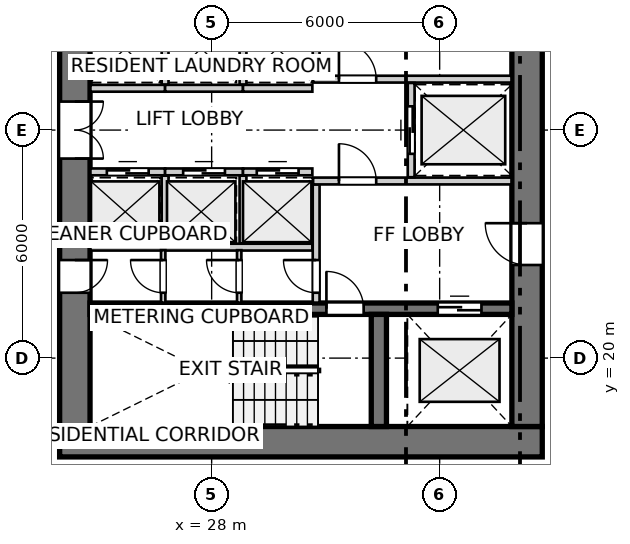
"""IFC4 building model, lengths in metres.
Left out: names, types, materials, properties, quantities, classifications, styles, units other than length and angle.
Written with IfcOpenShell. Run it as: python <this file> out.ifc"""

import sys

from ifc_helpers import new_model, si_unit, direction, frame, frame_2d, origin, place, context, subcontext, project, spatial, rectangle, extrude, source, transform, mapped, element, fill, save


model = new_model("IFC4")
c1 = context("Model", 3, precision=1e-05, world=origin(), true_north=direction((0.0, 1.0)))
c2 = subcontext(c1, "Body", "Model", "MODEL_VIEW")
j1 = project(units=[si_unit("LENGTHUNIT", "METRE"), si_unit("PLANEANGLEUNIT", "RADIAN")], contexts=[c1])
p1 = place(None, origin())
s1 = spatial("IfcSite", under=j1, at=p1, CompositionType="ELEMENT")
p2 = place(p1, origin())
s2 = spatial("IfcBuilding", under=s1, at=p2, CompositionType="ELEMENT")
p3 = place(p2, frame((0.0, 0.0, 30.2)))
s3 = spatial("IfcBuildingStorey", under=s2, at=p3, CompositionType="ELEMENT", Elevation=30.2)
p4 = place(p3, frame((24.0, 17.8, 0.0), z_axis=(0.0, 0.0, 1.0), x_axis=(1.0, 0.0, 0.0)))
e1 = element("IfcWall", 1, at=p4, inside=s3, PredefinedType="SHEAR", context=c2, shape_type="SweptSolid", body=[
    extrude(rectangle(XDim=12.7, YDim=0.8, at=frame_2d((6.35, 0.0))), origin(), (0.0, 0.0, 1.0), 2.935),
])
p5 = place(p3, frame((24.4, 33.8, 0.0), z_axis=(0.0, 0.0, 1.0), x_axis=(0.0, -1.0, 0.0)))
e2 = element("IfcWall", 2, at=p5, inside=s3, PredefinedType="SHEAR", context=c2, shape_type="SweptSolid", body=[
    extrude(rectangle(XDim=15.6, YDim=0.8, at=frame_2d((7.8, 0.0))), origin(), (0.0, 0.0, 1.0), 2.935),
])
p6 = place(p5, frame((7.05, 0.0, 0.0)))
e3 = element("IfcOpeningElement", 3, at=p6, cuts=e2, PredefinedType="OPENING", context=c2, shape_type="SweptSolid", body=[
    extrude(rectangle(XDim=1.5, YDim=2.15, at=frame_2d((0.75, 1.075))), frame((0.0, 0.41, 0.0), z_axis=(0.0, -1.0, 0.0), x_axis=(1.0, 0.0, 0.0)), (0.0, 0.0, 1.0), 0.82),
])
p7 = place(p5, frame((3.52, 0.0, 0.0)))
e4 = element("IfcOpeningElement", 4, at=p7, cuts=e2, PredefinedType="OPENING", context=c2, shape_type="SweptSolid", body=[
    extrude(rectangle(XDim=0.86, YDim=2.05, at=frame_2d((0.43, 1.025))), frame((0.0, 0.41, 0.0), z_axis=(0.0, -1.0, 0.0), x_axis=(1.0, 0.0, 0.0)), (0.0, 0.0, 1.0), 0.82),
])
p8 = place(p5, frame((11.22, 0.0, 0.0)))
e5 = element("IfcOpeningElement", 5, at=p8, cuts=e2, PredefinedType="OPENING", context=c2, shape_type="SweptSolid", body=[
    extrude(rectangle(XDim=0.86, YDim=2.05, at=frame_2d((0.43, 1.025))), frame((0.0, 0.41, 0.0), z_axis=(0.0, -1.0, 0.0), x_axis=(1.0, 0.0, 0.0)), (0.0, 0.0, 1.0), 0.82),
])
p9 = place(p3, frame((36.3, 18.2, 0.0), z_axis=(0.0, 0.0, 1.0), x_axis=(0.0, 1.0, 0.0)))
e6 = element("IfcWall", 6, at=p9, inside=s3, PredefinedType="SHEAR", context=c2, shape_type="SweptSolid", body=[
    extrude(rectangle(XDim=15.6, YDim=0.8, at=frame_2d((7.8, 0.0))), origin(), (0.0, 0.0, 1.0), 2.935),
])
p10 = place(p9, frame((4.25, 0.0, 0.0)))
e7 = element("IfcOpeningElement", 7, at=p10, cuts=e6, PredefinedType="OPENING", context=c2, shape_type="SweptSolid", body=[
    extrude(rectangle(XDim=1.1, YDim=2.15, at=frame_2d((0.55, 1.075))), frame((0.0, 0.41, 0.0), z_axis=(0.0, -1.0, 0.0), x_axis=(1.0, 0.0, 0.0)), (0.0, 0.0, 1.0), 0.82),
])
p11 = place(p9, frame((10.25, 0.0, 0.0)))
e8 = element("IfcOpeningElement", 8, at=p11, cuts=e6, PredefinedType="OPENING", context=c2, shape_type="SweptSolid", body=[
    extrude(rectangle(XDim=1.1, YDim=2.15, at=frame_2d((0.55, 1.075))), frame((0.0, 0.41, 0.0), z_axis=(0.0, -1.0, 0.0), x_axis=(1.0, 0.0, 0.0)), (0.0, 0.0, 1.0), 0.82),
])
p12 = place(p3, frame((24.8, 21.3, 0.0), z_axis=(0.0, 0.0, 1.0), x_axis=(1.0, 0.0, 0.0)))
e9 = element("IfcWall", 9, at=p12, inside=s3, PredefinedType="SHEAR", context=c2, shape_type="SweptSolid", body=[
    extrude(rectangle(XDim=11.1, YDim=0.3, at=frame_2d((5.55, 0.0))), origin(), (0.0, 0.0, 1.0), 2.935),
])
p13 = place(p12, frame((6.22, 0.0, 0.0)))
e10 = element("IfcOpeningElement", 10, at=p13, cuts=e9, PredefinedType="OPENING", context=c2, shape_type="SweptSolid", body=[
    extrude(rectangle(XDim=0.98, YDim=2.15, at=frame_2d((0.49, 1.075))), frame((0.0, 0.16, 0.0), z_axis=(0.0, -1.0, 0.0), x_axis=(1.0, 0.0, 0.0)), (0.0, 0.0, 1.0), 0.32),
])
p14 = place(p12, frame((9.15, 0.0, 0.0)))
e11 = element("IfcOpeningElement", 11, at=p14, cuts=e9, PredefinedType="OPENING", context=c2, shape_type="SweptSolid", body=[
    extrude(rectangle(XDim=1.15, YDim=2.15, at=frame_2d((0.575, 1.075))), frame((0.0, 0.16, 0.0), z_axis=(0.0, -1.0, 0.0), x_axis=(1.0, 0.0, 0.0)), (0.0, 0.0, 1.0), 0.32),
])
p15 = place(p3, frame((32.4, 18.2, 0.0), z_axis=(0.0, 0.0, 1.0), x_axis=(0.0, 1.0, 0.0)))
e12 = element("IfcWall", 12, at=p15, inside=s3, PredefinedType="SHEAR", context=c2, shape_type="SweptSolid", body=[
    extrude(rectangle(XDim=2.95, YDim=0.4, at=frame_2d((1.475, 0.0))), origin(), (0.0, 0.0, 1.0), 2.935),
])
p16 = place(p3, frame((30.75, 21.46, 0.0), z_axis=(0.0, 0.0, 1.0), x_axis=(0.0, 1.0, 0.0)))
e13 = element("IfcWall", 13, at=p16, inside=s3, PredefinedType="PARTITIONING", context=c2, shape_type="SweptSolid", body=[
    extrude(rectangle(XDim=3.11, YDim=0.18, at=frame_2d((1.555, 0.0))), origin(), (0.0, 0.0, 1.0), 2.935),
])
p17 = place(p16, frame((0.26, 0.0, 0.0)))
e14 = element("IfcOpeningElement", 14, at=p17, cuts=e13, PredefinedType="OPENING", context=c2, shape_type="SweptSolid", body=[
    extrude(rectangle(XDim=0.86, YDim=2.05, at=frame_2d((0.43, 1.025))), frame((0.0, 0.1, 0.0), z_axis=(0.0, -1.0, 0.0), x_axis=(1.0, 0.0, 0.0)), (0.0, 0.0, 1.0), 0.2),
])
p18 = place(p3, frame((30.67, 24.66, 0.0), z_axis=(0.0, 0.0, 1.0), x_axis=(1.0, 0.0, 0.0)))
e15 = element("IfcWall", 15, at=p18, inside=s3, PredefinedType="PARTITIONING", context=c2, shape_type="SweptSolid", body=[
    extrude(rectangle(XDim=5.22, YDim=0.18, at=frame_2d((2.61, 0.0))), origin(), (0.0, 0.0, 1.0), 2.935),
])
p19 = place(p18, frame((0.68, 0.0, 0.0)))
e16 = element("IfcOpeningElement", 16, at=p19, cuts=e15, PredefinedType="OPENING", context=c2, shape_type="SweptSolid", body=[
    extrude(rectangle(XDim=0.98, YDim=2.15, at=frame_2d((0.49, 1.075))), frame((0.0, 0.1, 0.0), z_axis=(0.0, -1.0, 0.0), x_axis=(1.0, 0.0, 0.0)), (0.0, 0.0, 1.0), 0.2),
])
p20 = place(p3, frame((30.75, 27.43, 0.0), z_axis=(0.0, 0.0, 1.0), x_axis=(0.0, 1.0, 0.0)))
e17 = element("IfcWall", 17, at=p20, inside=s3, PredefinedType="PARTITIONING", context=c2, shape_type="SweptSolid", body=[
    extrude(rectangle(XDim=3.11, YDim=0.18, at=frame_2d((1.555, 0.0))), origin(), (0.0, 0.0, 1.0), 2.935),
])
p21 = place(p20, frame((1.98, 0.0, 0.0)))
e18 = element("IfcOpeningElement", 18, at=p21, cuts=e17, PredefinedType="OPENING", context=c2, shape_type="SweptSolid", body=[
    extrude(rectangle(XDim=0.86, YDim=2.05, at=frame_2d((0.43, 1.025))), frame((0.0, 0.1, 0.0), z_axis=(0.0, -1.0, 0.0), x_axis=(1.0, 0.0, 0.0)), (0.0, 0.0, 1.0), 0.2),
])
p22 = place(p3, frame((30.67, 27.34, 0.0), z_axis=(0.0, 0.0, 1.0), x_axis=(1.0, 0.0, 0.0)))
e19 = element("IfcWall", 19, at=p22, inside=s3, PredefinedType="PARTITIONING", context=c2, shape_type="SweptSolid", body=[
    extrude(rectangle(XDim=5.22, YDim=0.18, at=frame_2d((2.61, 0.0))), origin(), (0.0, 0.0, 1.0), 2.935),
])
p23 = place(p22, frame((0.68, 0.0, 0.0)))
e20 = element("IfcOpeningElement", 20, at=p23, cuts=e19, PredefinedType="OPENING", context=c2, shape_type="SweptSolid", body=[
    extrude(rectangle(XDim=0.98, YDim=2.15, at=frame_2d((0.49, 1.075))), frame((0.0, 0.1, 0.0), z_axis=(0.0, -1.0, 0.0), x_axis=(1.0, 0.0, 0.0)), (0.0, 0.0, 1.0), 0.2),
])
p24 = place(p3, frame((33.25, 24.76, 0.0), z_axis=(0.0, 0.0, 1.0), x_axis=(0.0, 1.0, 0.0)))
e21 = element("IfcWall", 21, at=p24, inside=s3, PredefinedType="PARTITIONING", context=c2, shape_type="SweptSolid", body=[
    extrude(rectangle(XDim=2.48, YDim=0.18, at=frame_2d((1.24, 0.0))), origin(), (0.0, 0.0, 1.0), 2.935),
])
p25 = place(p24, frame((0.615, 0.0, 0.0)))
e22 = element("IfcOpeningElement", 22, at=p25, cuts=e21, PredefinedType="OPENING", context=c2, shape_type="SweptSolid", body=[
    extrude(rectangle(XDim=1.25, YDim=2.15, at=frame_2d((0.625, 1.075))), frame((0.0, 0.1, 0.0), z_axis=(0.0, -1.0, 0.0), x_axis=(1.0, 0.0, 0.0)), (0.0, 0.0, 1.0), 0.2),
])
p26 = place(p3, frame((24.81, 22.92, 0.0), z_axis=(0.0, 0.0, 1.0), x_axis=(1.0, 0.0, 0.0)))
e23 = element("IfcWall", 23, at=p26, inside=s3, PredefinedType="PARTITIONING", context=c2, shape_type="SweptSolid", body=[
    extrude(rectangle(XDim=5.84, YDim=0.18, at=frame_2d((2.92, 0.0))), origin(), (0.0, 0.0, 1.0), 2.935),
])
p27 = place(p3, frame((24.81, 24.9, 0.0), z_axis=(0.0, 0.0, 1.0), x_axis=(1.0, 0.0, 0.0)))
e24 = element("IfcWall", 24, at=p27, inside=s3, PredefinedType="PARTITIONING", context=c2, shape_type="SweptSolid", body=[
    extrude(rectangle(XDim=1.965, YDim=0.18, at=frame_2d((0.982, 0.0))), origin(), (0.0, 0.0, 1.0), 2.935),
])
p28 = place(p27, frame((0.433, 0.0, 0.0)))
e25 = element("IfcOpeningElement", 25, at=p28, cuts=e24, PredefinedType="OPENING", context=c2, shape_type="SweptSolid", body=[
    extrude(rectangle(XDim=1.1, YDim=2.15, at=frame_2d((0.55, 1.075))), frame((0.0, 0.1, 0.0), z_axis=(0.0, -1.0, 0.0), x_axis=(1.0, 0.0, 0.0)), (0.0, 0.0, 1.0), 0.2),
])
p29 = place(p3, frame((26.775, 24.9, 0.0), z_axis=(0.0, 0.0, 1.0), x_axis=(1.0, 0.0, 0.0)))
e26 = element("IfcWall", 26, at=p29, inside=s3, PredefinedType="PARTITIONING", context=c2, shape_type="SweptSolid", body=[
    extrude(rectangle(XDim=2.05, YDim=0.18, at=frame_2d((1.025, 0.0))), origin(), (0.0, 0.0, 1.0), 2.935),
])
p30 = place(p29, frame((0.475, 0.0, 0.0)))
e27 = element("IfcOpeningElement", 27, at=p30, cuts=e26, PredefinedType="OPENING", context=c2, shape_type="SweptSolid", body=[
    extrude(rectangle(XDim=1.1, YDim=2.15, at=frame_2d((0.55, 1.075))), frame((0.0, 0.1, 0.0), z_axis=(0.0, -1.0, 0.0), x_axis=(1.0, 0.0, 0.0)), (0.0, 0.0, 1.0), 0.2),
])
p31 = place(p3, frame((26.775, 23.02, 0.0), z_axis=(0.0, 0.0, 1.0), x_axis=(0.0, 1.0, 0.0)))
e28 = element("IfcWall", 28, at=p31, inside=s3, PredefinedType="PARTITIONING", context=c2, shape_type="SweptSolid", body=[
    extrude(rectangle(XDim=1.78, YDim=0.18, at=frame_2d((0.89, 0.0))), origin(), (0.0, 0.0, 1.0), 2.935),
])
p32 = place(p3, frame((28.825, 24.9, 0.0), z_axis=(0.0, 0.0, 1.0), x_axis=(1.0, 0.0, 0.0)))
e29 = element("IfcWall", 29, at=p32, inside=s3, PredefinedType="PARTITIONING", context=c2, shape_type="SweptSolid", body=[
    extrude(rectangle(XDim=1.825, YDim=0.18, at=frame_2d((0.913, 0.0))), origin(), (0.0, 0.0, 1.0), 2.935),
])
p33 = place(p32, frame((0.363, 0.0, 0.0)))
e30 = element("IfcOpeningElement", 30, at=p33, cuts=e29, PredefinedType="OPENING", context=c2, shape_type="SweptSolid", body=[
    extrude(rectangle(XDim=1.1, YDim=2.15, at=frame_2d((0.55, 1.075))), frame((0.0, 0.1, 0.0), z_axis=(0.0, -1.0, 0.0), x_axis=(1.0, 0.0, 0.0)), (0.0, 0.0, 1.0), 0.2),
])
p34 = place(p3, frame((28.825, 23.02, 0.0), z_axis=(0.0, 0.0, 1.0), x_axis=(0.0, 1.0, 0.0)))
e31 = element("IfcWall", 31, at=p34, inside=s3, PredefinedType="PARTITIONING", context=c2, shape_type="SweptSolid", body=[
    extrude(rectangle(XDim=1.78, YDim=0.18, at=frame_2d((0.89, 0.0))), origin(), (0.0, 0.0, 1.0), 2.935),
])
p35 = place(p3, frame((24.81, 27.1, 0.0), z_axis=(0.0, 0.0, 1.0), x_axis=(1.0, 0.0, 0.0)))
e32 = element("IfcWall", 32, at=p35, inside=s3, PredefinedType="PARTITIONING", context=c2, shape_type="SweptSolid", body=[
    extrude(rectangle(XDim=1.965, YDim=0.18, at=frame_2d((0.982, 0.0))), origin(), (0.0, 0.0, 1.0), 2.935),
])
p36 = place(p3, frame((26.775, 27.1, 0.0), z_axis=(0.0, 0.0, 1.0), x_axis=(1.0, 0.0, 0.0)))
e33 = element("IfcWall", 33, at=p36, inside=s3, PredefinedType="PARTITIONING", context=c2, shape_type="SweptSolid", body=[
    extrude(rectangle(XDim=2.05, YDim=0.18, at=frame_2d((1.025, 0.0))), origin(), (0.0, 0.0, 1.0), 2.935),
])
p37 = place(p3, frame((26.775, 27.2, 0.0), z_axis=(0.0, 0.0, 1.0), x_axis=(0.0, 1.0, 0.0)))
e34 = element("IfcWall", 34, at=p37, inside=s3, PredefinedType="PARTITIONING", context=c2, shape_type="SweptSolid", body=[
    extrude(rectangle(XDim=1.78, YDim=0.18, at=frame_2d((0.89, 0.0))), origin(), (0.0, 0.0, 1.0), 2.935),
])
p38 = place(p3, frame((28.825, 27.1, 0.0), z_axis=(0.0, 0.0, 1.0), x_axis=(1.0, 0.0, 0.0)))
e35 = element("IfcWall", 35, at=p38, inside=s3, PredefinedType="PARTITIONING", context=c2, shape_type="SweptSolid", body=[
    extrude(rectangle(XDim=1.825, YDim=0.18, at=frame_2d((0.913, 0.0))), origin(), (0.0, 0.0, 1.0), 2.935),
])
p39 = place(p3, frame((28.825, 27.2, 0.0), z_axis=(0.0, 0.0, 1.0), x_axis=(0.0, 1.0, 0.0)))
e36 = element("IfcWall", 36, at=p39, inside=s3, PredefinedType="PARTITIONING", context=c2, shape_type="SweptSolid", body=[
    extrude(rectangle(XDim=1.78, YDim=0.18, at=frame_2d((0.89, 0.0))), origin(), (0.0, 0.0, 1.0), 2.935),
])
p40 = place(p3, frame((26.725, 21.46, 0.0), z_axis=(0.0, 0.0, 1.0), x_axis=(0.0, 1.0, 0.0)))
e37 = element("IfcWall", 37, at=p40, inside=s3, PredefinedType="PARTITIONING", context=c2, shape_type="SweptSolid", body=[
    extrude(rectangle(XDim=1.38, YDim=0.115, at=frame_2d((0.69, 0.0))), origin(), (0.0, 0.0, 1.0), 2.935),
])
p41 = place(p40, frame((0.26, 0.0, 0.0)))
e38 = element("IfcOpeningElement", 38, at=p41, cuts=e37, PredefinedType="OPENING", context=c2, shape_type="SweptSolid", body=[
    extrude(rectangle(XDim=0.86, YDim=2.05, at=frame_2d((0.43, 1.025))), frame((0.0, 0.067, 0.0), z_axis=(0.0, -1.0, 0.0), x_axis=(1.0, 0.0, 0.0)), (0.0, 0.0, 1.0), 0.135),
])
p42 = place(p3, frame((28.725, 21.46, 0.0), z_axis=(0.0, 0.0, 1.0), x_axis=(0.0, 1.0, 0.0)))
e39 = element("IfcWall", 39, at=p42, inside=s3, PredefinedType="PARTITIONING", context=c2, shape_type="SweptSolid", body=[
    extrude(rectangle(XDim=1.38, YDim=0.115, at=frame_2d((0.69, 0.0))), origin(), (0.0, 0.0, 1.0), 2.935),
])
p43 = place(p42, frame((0.26, 0.0, 0.0)))
e40 = element("IfcOpeningElement", 40, at=p43, cuts=e39, PredefinedType="OPENING", context=c2, shape_type="SweptSolid", body=[
    extrude(rectangle(XDim=0.86, YDim=2.05, at=frame_2d((0.43, 1.025))), frame((0.0, 0.067, 0.0), z_axis=(0.0, -1.0, 0.0), x_axis=(1.0, 0.0, 0.0)), (0.0, 0.0, 1.0), 0.135),
])
m1 = source(origin(), c2, "Body", "SweptSolid", [
    extrude(rectangle(XDim=0.98, YDim=2.15, at=frame_2d((0.49, 1.075))), frame((0.0, 0.025, 0.0), z_axis=(0.0, -1.0, 0.0), x_axis=(1.0, 0.0, 0.0)), (0.0, 0.0, 1.0), 0.05),
])
p44 = place(p13, origin())
e41 = element("IfcDoor", 41, at=p44, inside=s3, OperationType="SINGLE_SWING_LEFT", PredefinedType="DOOR", context=c2, shape_type="MappedRepresentation", body=[
    mapped(m1, transform((0.0, 0.0, 0.0), x_axis=(1.0, 0.0, 0.0), y_axis=(0.0, 1.0, 0.0), z_axis=(0.0, 0.0, 1.0), scale=1.0)),
])
fill(e10, e41)
m2 = source(origin(), c2, "Body", "SweptSolid", [
    extrude(rectangle(XDim=1.15, YDim=2.15, at=frame_2d((0.575, 1.075))), frame((0.0, 0.025, 0.0), z_axis=(0.0, -1.0, 0.0), x_axis=(1.0, 0.0, 0.0)), (0.0, 0.0, 1.0), 0.05),
])
p45 = place(p14, origin())
e42 = element("IfcDoor", 42, at=p45, inside=s3, OperationType="DOUBLE_DOOR_SLIDING", PredefinedType="DOOR", context=c2, shape_type="MappedRepresentation", body=[
    mapped(m2, transform((0.0, 0.0, 0.0), x_axis=(1.0, 0.0, 0.0), y_axis=(0.0, 1.0, 0.0), z_axis=(0.0, 0.0, 1.0), scale=1.0)),
])
fill(e11, e42)
m3 = source(origin(), c2, "Body", "SweptSolid", [
    extrude(rectangle(XDim=1.1, YDim=2.15, at=frame_2d((0.55, 1.075))), frame((0.0, 0.025, 0.0), z_axis=(0.0, -1.0, 0.0), x_axis=(1.0, 0.0, 0.0)), (0.0, 0.0, 1.0), 0.05),
])
p46 = place(p10, origin())
e43 = element("IfcDoor", 43, at=p46, inside=s3, OperationType="SINGLE_SWING_RIGHT", PredefinedType="DOOR", context=c2, shape_type="MappedRepresentation", body=[
    mapped(m3, transform((0.0, 0.0, 0.0), x_axis=(1.0, 0.0, 0.0), y_axis=(0.0, 1.0, 0.0), z_axis=(0.0, 0.0, 1.0), scale=1.0)),
])
fill(e7, e43)
m4 = source(origin(), c2, "Body", "SweptSolid", [
    extrude(rectangle(XDim=1.5, YDim=2.15, at=frame_2d((0.75, 1.075))), frame((0.0, 0.025, 0.0), z_axis=(0.0, -1.0, 0.0), x_axis=(1.0, 0.0, 0.0)), (0.0, 0.0, 1.0), 0.05),
])
p47 = place(p6, origin())
e44 = element("IfcDoor", 44, at=p47, inside=s3, OperationType="DOUBLE_DOOR_SINGLE_SWING", PredefinedType="DOOR", context=c2, shape_type="MappedRepresentation", body=[
    mapped(m4, transform((0.0, 0.0, 0.0), x_axis=(1.0, 0.0, 0.0), y_axis=(0.0, 1.0, 0.0), z_axis=(0.0, 0.0, 1.0), scale=1.0)),
])
fill(e3, e44)
m5 = source(origin(), c2, "Body", "SweptSolid", [
    extrude(rectangle(XDim=0.86, YDim=2.05, at=frame_2d((0.43, 1.025))), frame((0.0, 0.025, 0.0), z_axis=(0.0, -1.0, 0.0), x_axis=(1.0, 0.0, 0.0)), (0.0, 0.0, 1.0), 0.05),
])
p48 = place(p8, origin())
e45 = element("IfcDoor", 45, at=p48, inside=s3, OperationType="SINGLE_SWING_LEFT", PredefinedType="DOOR", context=c2, shape_type="MappedRepresentation", body=[
    mapped(m5, transform((0.0, 0.0, 0.0), x_axis=(1.0, 0.0, 0.0), y_axis=(0.0, 1.0, 0.0), z_axis=(0.0, 0.0, 1.0), scale=1.0)),
])
fill(e5, e45)
p49 = place(p17, origin())
e46 = element("IfcDoor", 46, at=p49, inside=s3, OperationType="SINGLE_SWING_RIGHT", PredefinedType="DOOR", context=c2, shape_type="MappedRepresentation", body=[
    mapped(m5, transform((0.0, 0.0, 0.0), x_axis=(1.0, 0.0, 0.0), y_axis=(0.0, 1.0, 0.0), z_axis=(0.0, 0.0, 1.0), scale=1.0)),
])
fill(e14, e46)
p50 = place(p19, origin())
e47 = element("IfcDoor", 47, at=p50, inside=s3, OperationType="SINGLE_SWING_LEFT", PredefinedType="DOOR", context=c2, shape_type="MappedRepresentation", body=[
    mapped(m1, transform((0.0, 0.0, 0.0), x_axis=(1.0, 0.0, 0.0), y_axis=(0.0, 1.0, 0.0), z_axis=(0.0, 0.0, 1.0), scale=1.0)),
])
fill(e16, e47)
p51 = place(p23, origin())
e48 = element("IfcDoor", 48, at=p51, inside=s3, OperationType="SINGLE_SWING_LEFT", PredefinedType="DOOR", context=c2, shape_type="MappedRepresentation", body=[
    mapped(m1, transform((0.0, 0.0, 0.0), x_axis=(1.0, 0.0, 0.0), y_axis=(0.0, 1.0, 0.0), z_axis=(0.0, 0.0, 1.0), scale=1.0)),
])
fill(e20, e48)
m6 = source(origin(), c2, "Body", "SweptSolid", [
    extrude(rectangle(XDim=1.25, YDim=2.15, at=frame_2d((0.625, 1.075))), frame((0.0, 0.025, 0.0), z_axis=(0.0, -1.0, 0.0), x_axis=(1.0, 0.0, 0.0)), (0.0, 0.0, 1.0), 0.05),
])
p52 = place(p25, origin())
e49 = element("IfcDoor", 49, at=p52, inside=s3, OperationType="DOUBLE_DOOR_SLIDING", PredefinedType="DOOR", context=c2, shape_type="MappedRepresentation", body=[
    mapped(m6, transform((0.0, 0.0, 0.0), x_axis=(1.0, 0.0, 0.0), y_axis=(0.0, 1.0, 0.0), z_axis=(0.0, 0.0, 1.0), scale=1.0)),
])
fill(e22, e49)
p53 = place(p28, origin())
e50 = element("IfcDoor", 50, at=p53, inside=s3, OperationType="DOUBLE_DOOR_SLIDING", PredefinedType="DOOR", context=c2, shape_type="MappedRepresentation", body=[
    mapped(m3, transform((0.0, 0.0, 0.0), x_axis=(1.0, 0.0, 0.0), y_axis=(0.0, 1.0, 0.0), z_axis=(0.0, 0.0, 1.0), scale=1.0)),
])
fill(e25, e50)
p54 = place(p30, origin())
e51 = element("IfcDoor", 51, at=p54, inside=s3, OperationType="DOUBLE_DOOR_SLIDING", PredefinedType="DOOR", context=c2, shape_type="MappedRepresentation", body=[
    mapped(m3, transform((0.0, 0.0, 0.0), x_axis=(1.0, 0.0, 0.0), y_axis=(0.0, 1.0, 0.0), z_axis=(0.0, 0.0, 1.0), scale=1.0)),
])
fill(e27, e51)
p55 = place(p33, origin())
e52 = element("IfcDoor", 52, at=p55, inside=s3, OperationType="DOUBLE_DOOR_SLIDING", PredefinedType="DOOR", context=c2, shape_type="MappedRepresentation", body=[
    mapped(m3, transform((0.0, 0.0, 0.0), x_axis=(1.0, 0.0, 0.0), y_axis=(0.0, 1.0, 0.0), z_axis=(0.0, 0.0, 1.0), scale=1.0)),
])
fill(e30, e52)
p56 = place(p41, origin())
e53 = element("IfcDoor", 53, at=p56, inside=s3, OperationType="SINGLE_SWING_RIGHT", PredefinedType="DOOR", context=c2, shape_type="MappedRepresentation", body=[
    mapped(m5, transform((0.0, 0.0, 0.0), x_axis=(1.0, 0.0, 0.0), y_axis=(0.0, 1.0, 0.0), z_axis=(0.0, 0.0, 1.0), scale=1.0)),
])
fill(e38, e53)
p57 = place(p43, origin())
e54 = element("IfcDoor", 54, at=p57, inside=s3, OperationType="SINGLE_SWING_RIGHT", PredefinedType="DOOR", context=c2, shape_type="MappedRepresentation", body=[
    mapped(m5, transform((0.0, 0.0, 0.0), x_axis=(1.0, 0.0, 0.0), y_axis=(0.0, 1.0, 0.0), z_axis=(0.0, 0.0, 1.0), scale=1.0)),
])
fill(e40, e54)
save(model, sys.argv[1])
